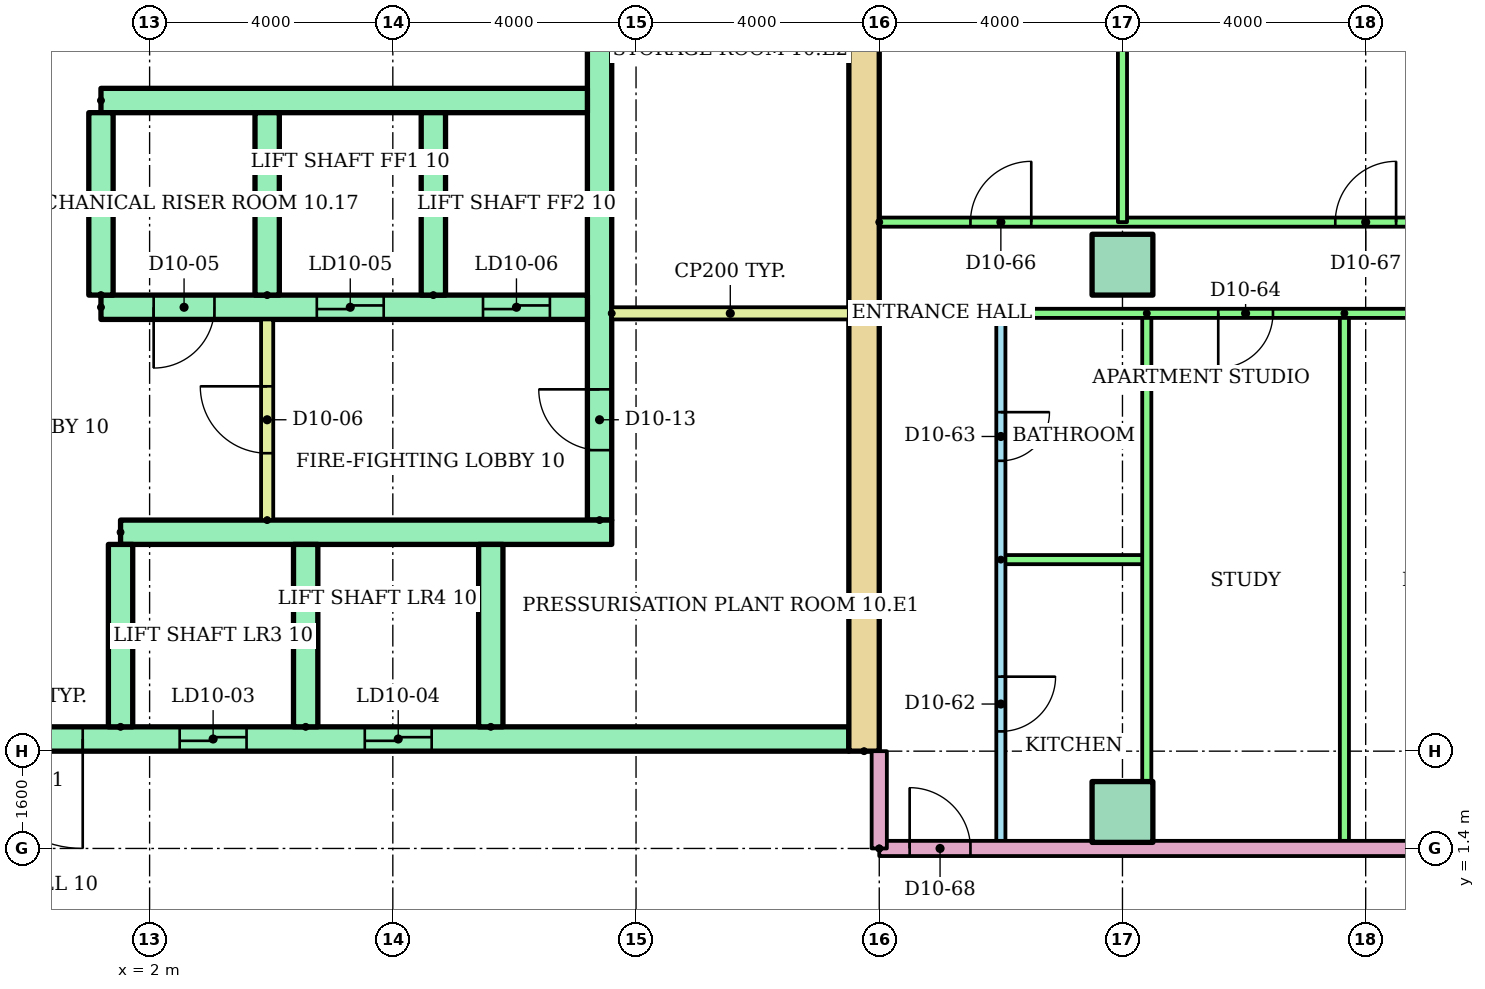
"""IFC4 building model, lengths in metres.
Left out: names, types, materials, properties, quantities, classifications, styles, units other than length and angle.
Written with IfcOpenShell. Run it as: python <this file> out.ifc"""

import sys

from ifc_helpers import new_model, si_unit, direction, frame, frame_2d, origin, origin_2d, place, context, subcontext, project, spatial, rectangle, extrude, element, fill, save


model = new_model("IFC4")
c1 = context("Model", 3, precision=1e-05, world=origin(), true_north=direction((0.0, 1.0)))
c2 = subcontext(c1, "Body", "Model", "MODEL_VIEW")
j1 = project(units=[si_unit("LENGTHUNIT", "METRE"), si_unit("PLANEANGLEUNIT", "RADIAN")], contexts=[c1])
p1 = place(None, origin())
s1 = spatial("IfcSite", under=j1, at=p1, CompositionType="ELEMENT")
p2 = place(p1, origin())
s2 = spatial("IfcBuilding", under=s1, at=p2, CompositionType="ELEMENT")
p3 = place(p2, frame((0.0, 0.0, 41.6)))
s3 = spatial("IfcBuildingStorey", under=s2, at=p3, CompositionType="ELEMENT", Elevation=41.6)
for number, where in (
    (1, (18.0, 2.0, 0.0)),
    (2, (18.0, 11.0, 0.0)),
):
    element("IfcColumn", number, at=place(p3, frame(where)), inside=s3, PredefinedType="COLUMN", context=c2, shape_type="SweptSolid", body=[
        extrude(rectangle(XDim=1.0, YDim=1.0, at=origin_2d()), origin(), (0.0, 0.0, 1.0), 3.2),
    ])
p4 = place(p3, frame((13.75, 3.0, 0.0), z_axis=(0.0, 0.0, 1.0), x_axis=(0.0, 1.0, 0.0)))
e3 = element("IfcWall", 3, at=p4, inside=s3, PredefinedType="SHEAR", context=c2, shape_type="SweptSolid", body=[
    extrude(rectangle(XDim=17.0, YDim=0.5, at=frame_2d((8.5, 0.0))), origin(), (0.0, 0.0, 1.0), 2.92),
])
p5 = place(p3, frame((9.4, 6.8, 0.0), z_axis=(0.0, 0.0, 1.0), x_axis=(0.0, 1.0, 0.0)))
e4 = element("IfcWall", 4, at=p5, inside=s3, PredefinedType="SHEAR", context=c2, shape_type="SweptSolid", body=[
    extrude(rectangle(XDim=12.7, YDim=0.4, at=frame_2d((6.35, 0.0))), origin(), (0.0, 0.0, 1.0), 2.92),
])
p6 = place(p5, frame((1.15, 0.0, 0.0)))
e5 = element("IfcOpeningElement", 5, at=p6, cuts=e4, PredefinedType="OPENING", context=c2, shape_type="SweptSolid", body=[
    extrude(rectangle(XDim=1.0, YDim=2.1, at=frame_2d((0.5, 1.05))), frame((0.0, 0.21, 0.0), z_axis=(0.0, -1.0, 0.0), x_axis=(1.0, 0.0, 0.0)), (0.0, 0.0, 1.0), 0.42),
])
p7 = place(p5, frame((7.925, 0.0, 0.0)))
e6 = element("IfcOpeningElement", 6, at=p7, cuts=e4, PredefinedType="OPENING", context=c2, shape_type="SweptSolid", body=[
    extrude(rectangle(XDim=1.0, YDim=2.1, at=frame_2d((0.5, 1.05))), frame((0.0, 0.21, 0.0), z_axis=(0.0, -1.0, 0.0), x_axis=(1.0, 0.0, 0.0)), (0.0, 0.0, 1.0), 0.42),
])
p8 = place(p3, frame((-13.5, 3.2, 0.0)))
e7 = element("IfcWall", 7, at=p8, inside=s3, PredefinedType="SHEAR", context=c2, shape_type="SweptSolid", body=[
    extrude(rectangle(XDim=27.0, YDim=0.4, at=frame_2d((13.5, 0.0))), origin(), (0.0, 0.0, 1.0), 2.92),
])
p9 = place(p8, frame((6.861, 0.0, 0.0)))
e8 = element("IfcOpeningElement", 8, at=p9, cuts=e7, PredefinedType="OPENING", context=c2, shape_type="SweptSolid", body=[
    extrude(rectangle(XDim=1.1, YDim=2.1, at=frame_2d((0.55, 1.05))), frame((0.0, 0.21, 0.0), z_axis=(0.0, -1.0, 0.0), x_axis=(1.0, 0.0, 0.0)), (0.0, 0.0, 1.0), 0.42),
])
p10 = place(p8, frame((9.906, 0.0, 0.0)))
e9 = element("IfcOpeningElement", 9, at=p10, cuts=e7, PredefinedType="OPENING", context=c2, shape_type="SweptSolid", body=[
    extrude(rectangle(XDim=1.1, YDim=2.1, at=frame_2d((0.55, 1.05))), frame((0.0, 0.21, 0.0), z_axis=(0.0, -1.0, 0.0), x_axis=(1.0, 0.0, 0.0)), (0.0, 0.0, 1.0), 0.42),
])
p11 = place(p8, frame((15.994, 0.0, 0.0)))
e10 = element("IfcOpeningElement", 10, at=p11, cuts=e7, PredefinedType="OPENING", context=c2, shape_type="SweptSolid", body=[
    extrude(rectangle(XDim=1.1, YDim=2.1, at=frame_2d((0.55, 1.05))), frame((0.0, 0.21, 0.0), z_axis=(0.0, -1.0, 0.0), x_axis=(1.0, 0.0, 0.0)), (0.0, 0.0, 1.0), 0.42),
])
p12 = place(p8, frame((19.039, 0.0, 0.0)))
e11 = element("IfcOpeningElement", 11, at=p12, cuts=e7, PredefinedType="OPENING", context=c2, shape_type="SweptSolid", body=[
    extrude(rectangle(XDim=1.1, YDim=2.1, at=frame_2d((0.55, 1.05))), frame((0.0, 0.21, 0.0), z_axis=(0.0, -1.0, 0.0), x_axis=(1.0, 0.0, 0.0)), (0.0, 0.0, 1.0), 0.42),
])
p13 = place(p8, frame((12.6, 0.0, 0.0)))
e12 = element("IfcOpeningElement", 12, at=p13, cuts=e7, PredefinedType="OPENING", context=c2, shape_type="SweptSolid", body=[
    extrude(rectangle(XDim=1.8, YDim=2.1, at=frame_2d((0.9, 1.05))), frame((0.0, 0.21, 0.0), z_axis=(0.0, -1.0, 0.0), x_axis=(1.0, 0.0, 0.0)), (0.0, 0.0, 1.0), 0.42),
])
p14 = place(p3, frame((1.522, 6.6, 0.0)))
e13 = element("IfcWall", 13, at=p14, inside=s3, PredefinedType="SHEAR", context=c2, shape_type="SweptSolid", body=[
    extrude(rectangle(XDim=8.078, YDim=0.4, at=frame_2d((4.039, 0.0))), origin(), (0.0, 0.0, 1.0), 2.92),
])
for number, where, z_axis, x_axis in (
    (14, (1.522, 3.4, 0.0), (0.0, 0.0, 1.0), (0.0, 1.0, 0.0)),
    (15, (4.567, 3.4, 0.0), (0.0, 0.0, 1.0), (0.0, 1.0, 0.0)),
    (16, (7.611, 3.4, 0.0), (0.0, 0.0, 1.0), (0.0, 1.0, 0.0)),
):
    element("IfcWall", number, at=place(p3, frame(where, z_axis=z_axis, x_axis=x_axis)), inside=s3, PredefinedType="SHEAR", context=c2, shape_type="SweptSolid", body=[
        extrude(rectangle(XDim=3.0, YDim=0.4, at=frame_2d((1.5, 0.0))), origin(), (0.0, 0.0, 1.0), 2.92),
    ])
p15 = place(p3, frame((1.2, 10.3, 0.0)))
e17 = element("IfcWall", 17, at=p15, inside=s3, PredefinedType="SHEAR", context=c2, shape_type="SweptSolid", body=[
    extrude(rectangle(XDim=8.0, YDim=0.4, at=frame_2d((4.0, 0.0))), origin(), (0.0, 0.0, 1.0), 2.92),
])
p16 = place(p15, frame((3.55, 0.0, 0.0)))
e18 = element("IfcOpeningElement", 18, at=p16, cuts=e17, PredefinedType="OPENING", context=c2, shape_type="SweptSolid", body=[
    extrude(rectangle(XDim=1.1, YDim=2.1, at=frame_2d((0.55, 1.05))), frame((0.0, 0.21, 0.0), z_axis=(0.0, -1.0, 0.0), x_axis=(1.0, 0.0, 0.0)), (0.0, 0.0, 1.0), 0.42),
])
p17 = place(p15, frame((6.283, 0.0, 0.0)))
e19 = element("IfcOpeningElement", 19, at=p17, cuts=e17, PredefinedType="OPENING", context=c2, shape_type="SweptSolid", body=[
    extrude(rectangle(XDim=1.1, YDim=2.1, at=frame_2d((0.55, 1.05))), frame((0.0, 0.21, 0.0), z_axis=(0.0, -1.0, 0.0), x_axis=(1.0, 0.0, 0.0)), (0.0, 0.0, 1.0), 0.42),
])
p18 = place(p15, frame((0.867, 0.0, 0.0)))
e20 = element("IfcOpeningElement", 20, at=p18, cuts=e17, PredefinedType="OPENING", context=c2, shape_type="SweptSolid", body=[
    extrude(rectangle(XDim=1.0, YDim=2.1, at=frame_2d((0.5, 1.05))), frame((0.0, 0.21, 0.0), z_axis=(0.0, -1.0, 0.0), x_axis=(1.0, 0.0, 0.0)), (0.0, 0.0, 1.0), 0.42),
])
p19 = place(p3, frame((1.2, 13.7, 0.0)))
e21 = element("IfcWall", 21, at=p19, inside=s3, PredefinedType="SHEAR", context=c2, shape_type="SweptSolid", body=[
    extrude(rectangle(XDim=8.0, YDim=0.4, at=frame_2d((4.0, 0.0))), origin(), (0.0, 0.0, 1.0), 2.92),
])
for number, where, z_axis, x_axis in (
    (22, (1.2, 10.5, 0.0), (0.0, 0.0, 1.0), (0.0, 1.0, 0.0)),
    (23, (3.933, 10.5, 0.0), (0.0, 0.0, 1.0), (0.0, 1.0, 0.0)),
    (24, (6.667, 10.5, 0.0), (0.0, 0.0, 1.0), (0.0, 1.0, 0.0)),
):
    element("IfcWall", number, at=place(p3, frame(where, z_axis=z_axis, x_axis=x_axis)), inside=s3, PredefinedType="SHEAR", context=c2, shape_type="SweptSolid", body=[
        extrude(rectangle(XDim=3.0, YDim=0.4, at=frame_2d((1.5, 0.0))), origin(), (0.0, 0.0, 1.0), 2.92),
    ])
p20 = place(p3, frame((3.933, 6.8, 0.0), z_axis=(0.0, 0.0, 1.0), x_axis=(0.0, 1.0, 0.0)))
e25 = element("IfcWall", 25, at=p20, inside=s3, PredefinedType="PARTITIONING", context=c2, shape_type="SweptSolid", body=[
    extrude(rectangle(XDim=3.3, YDim=0.2, at=frame_2d((1.65, 0.0))), origin(), (0.0, 0.0, 1.0), 2.92),
])
p21 = place(p20, frame((1.1, 0.0, 0.0)))
e26 = element("IfcOpeningElement", 26, at=p21, cuts=e25, PredefinedType="OPENING", context=c2, shape_type="SweptSolid", body=[
    extrude(rectangle(XDim=1.1, YDim=2.1, at=frame_2d((0.55, 1.05))), frame((0.0, 0.11, 0.0), z_axis=(0.0, -1.0, 0.0), x_axis=(1.0, 0.0, 0.0)), (0.0, 0.0, 1.0), 0.22),
])
p22 = place(p3, frame((9.6, 10.2, 0.0)))
e27 = element("IfcWall", 27, at=p22, inside=s3, PredefinedType="PARTITIONING", context=c2, shape_type="SweptSolid", body=[
    extrude(rectangle(XDim=3.9, YDim=0.2, at=frame_2d((1.95, 0.0))), origin(), (0.0, 0.0, 1.0), 2.92),
])
p23 = place(p3, frame((16.0, 10.2, 0.0), z_axis=(0.0, 0.0, 1.0), x_axis=(0.0, -1.0, 0.0)))
e28 = element("IfcWall", 28, at=p23, inside=s3, PredefinedType="PARTITIONING", context=c2, shape_type="SweptSolid", body=[
    extrude(rectangle(XDim=8.8, YDim=0.15, at=frame_2d((4.4, 0.0))), origin(), (0.0, 0.0, 1.0), 2.4),
])
p24 = place(p23, frame((5.975, 0.0, 0.0)))
e29 = element("IfcOpeningElement", 29, at=p24, cuts=e28, PredefinedType="OPENING", context=c2, shape_type="SweptSolid", body=[
    extrude(rectangle(XDim=0.9, YDim=2.1, at=frame_2d((0.45, 1.05))), frame((0.0, 0.085, 0.0), z_axis=(0.0, -1.0, 0.0), x_axis=(1.0, 0.0, 0.0)), (0.0, 0.0, 1.0), 0.17),
])
p25 = place(p23, frame((1.625, 0.0, 0.0)))
e30 = element("IfcOpeningElement", 30, at=p25, cuts=e28, PredefinedType="OPENING", context=c2, shape_type="SweptSolid", body=[
    extrude(rectangle(XDim=0.8, YDim=2.1, at=frame_2d((0.4, 1.05))), frame((0.0, 0.085, 0.0), z_axis=(0.0, -1.0, 0.0), x_axis=(1.0, 0.0, 0.0)), (0.0, 0.0, 1.0), 0.17),
])
p26 = place(p3, frame((16.0, 6.15, 0.0)))
e31 = element("IfcWall", 31, at=p26, inside=s3, PredefinedType="PARTITIONING", context=c2, shape_type="SweptSolid", body=[
    extrude(rectangle(XDim=2.4, YDim=0.15, at=frame_2d((1.2, 0.0))), origin(), (0.0, 0.0, 1.0), 2.4),
])
for number, where, z_axis, x_axis in (
    (32, (18.4, 10.2, 0.0), (0.0, 0.0, 1.0), (0.0, -1.0, 0.0)),
    (33, (21.65, 10.2, 0.0), (0.0, 0.0, 1.0), (0.0, -1.0, 0.0)),
):
    element("IfcWall", number, at=place(p3, frame(where, z_axis=z_axis, x_axis=x_axis)), inside=s3, PredefinedType="PARTITIONING", context=c2, shape_type="SweptSolid", body=[
        extrude(rectangle(XDim=8.8, YDim=0.15, at=frame_2d((4.4, 0.0))), origin(), (0.0, 0.0, 1.0), 2.4),
    ])
p27 = place(p3, frame((26.0, 10.2, 0.0), z_axis=(0.0, 0.0, 1.0), x_axis=(-1.0, 0.0, 0.0)))
e34 = element("IfcWall", 34, at=p27, inside=s3, PredefinedType="PARTITIONING", context=c2, shape_type="SweptSolid", body=[
    extrude(rectangle(XDim=10.0, YDim=0.15, at=frame_2d((5.0, 0.0))), origin(), (0.0, 0.0, 1.0), 2.4),
])
p28 = place(p27, frame((5.525, 0.0, 0.0)))
e35 = element("IfcOpeningElement", 35, at=p28, cuts=e34, PredefinedType="OPENING", context=c2, shape_type="SweptSolid", body=[
    extrude(rectangle(XDim=0.9, YDim=2.1, at=frame_2d((0.45, 1.05))), frame((0.0, 0.085, 0.0), z_axis=(0.0, -1.0, 0.0), x_axis=(1.0, 0.0, 0.0)), (0.0, 0.0, 1.0), 0.17),
])
p29 = place(p27, frame((1.725, 0.0, 0.0)))
e36 = element("IfcOpeningElement", 36, at=p29, cuts=e34, PredefinedType="OPENING", context=c2, shape_type="SweptSolid", body=[
    extrude(rectangle(XDim=0.9, YDim=2.1, at=frame_2d((0.45, 1.05))), frame((0.0, 0.085, 0.0), z_axis=(0.0, -1.0, 0.0), x_axis=(1.0, 0.0, 0.0)), (0.0, 0.0, 1.0), 0.17),
])
p30 = place(p3, frame((14.0, 11.7, 0.0)))
e37 = element("IfcWall", 37, at=p30, inside=s3, PredefinedType="PARTITIONING", context=c2, shape_type="SweptSolid", body=[
    extrude(rectangle(XDim=12.0, YDim=0.15, at=frame_2d((6.0, 0.0))), origin(), (0.0, 0.0, 1.0), 2.4),
])
p31 = place(p30, frame((1.5, 0.0, 0.0)))
e38 = element("IfcOpeningElement", 38, at=p31, cuts=e37, PredefinedType="OPENING", context=c2, shape_type="SweptSolid", body=[
    extrude(rectangle(XDim=1.0, YDim=2.1, at=frame_2d((0.5, 1.05))), frame((0.0, 0.085, 0.0), z_axis=(0.0, -1.0, 0.0), x_axis=(1.0, 0.0, 0.0)), (0.0, 0.0, 1.0), 0.17),
])
p32 = place(p30, frame((7.5, 0.0, 0.0)))
e39 = element("IfcOpeningElement", 39, at=p32, cuts=e37, PredefinedType="OPENING", context=c2, shape_type="SweptSolid", body=[
    extrude(rectangle(XDim=1.0, YDim=2.1, at=frame_2d((0.5, 1.05))), frame((0.0, 0.085, 0.0), z_axis=(0.0, -1.0, 0.0), x_axis=(1.0, 0.0, 0.0)), (0.0, 0.0, 1.0), 0.17),
])
p33 = place(p3, frame((18.0, 18.521, 0.0), z_axis=(0.0, 0.0, 1.0), x_axis=(0.0, -1.0, 0.0)))
e40 = element("IfcWall", 40, at=p33, inside=s3, PredefinedType="PARTITIONING", context=c2, shape_type="SweptSolid", body=[
    extrude(rectangle(XDim=6.821, YDim=0.15, at=frame_2d((3.411, 0.0))), origin(), (0.0, 0.0, 1.0), 2.4),
])
p34 = place(p3, frame((14.0, 1.4, 0.0)))
e41 = element("IfcWall", 41, at=p34, inside=s3, PredefinedType="PARTITIONING", context=c2, shape_type="SweptSolid", body=[
    extrude(rectangle(XDim=15.0, YDim=0.25, at=frame_2d((7.5, 0.0))), origin(), (0.0, 0.0, 1.0), 2.4),
])
p35 = place(p34, frame((0.5, 0.0, 0.0)))
e42 = element("IfcOpeningElement", 42, at=p35, cuts=e41, PredefinedType="OPENING", context=c2, shape_type="SweptSolid", body=[
    extrude(rectangle(XDim=1.0, YDim=2.1, at=frame_2d((0.5, 1.05))), frame((0.0, 0.135, 0.0), z_axis=(0.0, -1.0, 0.0), x_axis=(1.0, 0.0, 0.0)), (0.0, 0.0, 1.0), 0.27),
])
p36 = place(p34, frame((12.76, 0.0, 0.0)))
e43 = element("IfcOpeningElement", 43, at=p36, cuts=e41, PredefinedType="OPENING", context=c2, shape_type="SweptSolid", body=[
    extrude(rectangle(XDim=1.0, YDim=2.1, at=frame_2d((0.5, 1.05))), frame((0.0, 0.135, 0.0), z_axis=(0.0, -1.0, 0.0), x_axis=(1.0, 0.0, 0.0)), (0.0, 0.0, 1.0), 0.27),
])
p37 = place(p3, frame((14.0, 1.4, 0.0), z_axis=(0.0, 0.0, 1.0), x_axis=(0.0, 1.0, 0.0)))
e44 = element("IfcWall", 44, at=p37, inside=s3, PredefinedType="PARTITIONING", context=c2, shape_type="SweptSolid", body=[
    extrude(rectangle(XDim=1.6, YDim=0.25, at=frame_2d((0.8, 0.0))), origin(), (0.0, 0.0, 1.0), 2.4),
])
p38 = place(p11, origin())
e45 = element("IfcDoor", 45, at=p38, inside=s3, OperationType="SLIDING_TO_LEFT", PredefinedType="DOOR", context=c2, shape_type="SweptSolid", body=[
    extrude(rectangle(XDim=1.1, YDim=2.1, at=frame_2d((0.55, 1.05))), frame((0.0, 0.025, 0.0), z_axis=(0.0, -1.0, 0.0), x_axis=(1.0, 0.0, 0.0)), (0.0, 0.0, 1.0), 0.05),
])
fill(e10, e45)
p39 = place(p12, origin())
e46 = element("IfcDoor", 46, at=p39, inside=s3, OperationType="SLIDING_TO_LEFT", PredefinedType="DOOR", context=c2, shape_type="SweptSolid", body=[
    extrude(rectangle(XDim=1.1, YDim=2.1, at=frame_2d((0.55, 1.05))), frame((0.0, 0.025, 0.0), z_axis=(0.0, -1.0, 0.0), x_axis=(1.0, 0.0, 0.0)), (0.0, 0.0, 1.0), 0.05),
])
fill(e11, e46)
p40 = place(p13, frame((1.8, 0.0, 0.0), z_axis=(0.0, 0.0, 1.0), x_axis=(-1.0, 0.0, 0.0)))
e47 = element("IfcDoor", 47, at=p40, inside=s3, OperationType="DOUBLE_DOOR_SINGLE_SWING", PredefinedType="DOOR", context=c2, shape_type="SweptSolid", body=[
    extrude(rectangle(XDim=1.8, YDim=2.1, at=frame_2d((0.9, 1.05))), frame((0.0, 0.025, 0.0), z_axis=(0.0, -1.0, 0.0), x_axis=(1.0, 0.0, 0.0)), (0.0, 0.0, 1.0), 0.05),
])
fill(e12, e47)
p41 = place(p16, origin())
e48 = element("IfcDoor", 48, at=p41, inside=s3, OperationType="SLIDING_TO_LEFT", PredefinedType="DOOR", context=c2, shape_type="SweptSolid", body=[
    extrude(rectangle(XDim=1.1, YDim=2.1, at=frame_2d((0.55, 1.05))), frame((0.0, 0.025, 0.0), z_axis=(0.0, -1.0, 0.0), x_axis=(1.0, 0.0, 0.0)), (0.0, 0.0, 1.0), 0.05),
])
fill(e18, e48)
p42 = place(p17, origin())
e49 = element("IfcDoor", 49, at=p42, inside=s3, OperationType="SLIDING_TO_LEFT", PredefinedType="DOOR", context=c2, shape_type="SweptSolid", body=[
    extrude(rectangle(XDim=1.1, YDim=2.1, at=frame_2d((0.55, 1.05))), frame((0.0, 0.025, 0.0), z_axis=(0.0, -1.0, 0.0), x_axis=(1.0, 0.0, 0.0)), (0.0, 0.0, 1.0), 0.05),
])
fill(e19, e49)
p43 = place(p18, frame((1.0, 0.0, 0.0), z_axis=(0.0, 0.0, 1.0), x_axis=(-1.0, 0.0, 0.0)))
e50 = element("IfcDoor", 50, at=p43, inside=s3, OperationType="SINGLE_SWING_LEFT", PredefinedType="DOOR", context=c2, shape_type="SweptSolid", body=[
    extrude(rectangle(XDim=1.0, YDim=2.1, at=frame_2d((0.5, 1.05))), frame((0.0, 0.025, 0.0), z_axis=(0.0, -1.0, 0.0), x_axis=(1.0, 0.0, 0.0)), (0.0, 0.0, 1.0), 0.05),
])
fill(e20, e50)
p44 = place(p21, origin())
e51 = element("IfcDoor", 51, at=p44, inside=s3, OperationType="SINGLE_SWING_RIGHT", PredefinedType="DOOR", context=c2, shape_type="SweptSolid", body=[
    extrude(rectangle(XDim=1.1, YDim=2.1, at=frame_2d((0.55, 1.05))), frame((0.0, 0.025, 0.0), z_axis=(0.0, -1.0, 0.0), x_axis=(1.0, 0.0, 0.0)), (0.0, 0.0, 1.0), 0.05),
])
fill(e26, e51)
p45 = place(p6, origin())
e52 = element("IfcDoor", 52, at=p45, inside=s3, OperationType="SINGLE_SWING_RIGHT", PredefinedType="DOOR", context=c2, shape_type="SweptSolid", body=[
    extrude(rectangle(XDim=1.0, YDim=2.1, at=frame_2d((0.5, 1.05))), frame((0.0, 0.025, 0.0), z_axis=(0.0, -1.0, 0.0), x_axis=(1.0, 0.0, 0.0)), (0.0, 0.0, 1.0), 0.05),
])
fill(e5, e52)
p46 = place(p24, origin())
e53 = element("IfcDoor", 53, at=p46, inside=s3, OperationType="SINGLE_SWING_LEFT", PredefinedType="DOOR", context=c2, shape_type="SweptSolid", body=[
    extrude(rectangle(XDim=0.9, YDim=2.1, at=frame_2d((0.45, 1.05))), frame((0.0, 0.025, 0.0), z_axis=(0.0, -1.0, 0.0), x_axis=(1.0, 0.0, 0.0)), (0.0, 0.0, 1.0), 0.05),
])
fill(e29, e53)
p47 = place(p25, origin())
e54 = element("IfcDoor", 54, at=p47, inside=s3, OperationType="SINGLE_SWING_LEFT", PredefinedType="DOOR", context=c2, shape_type="SweptSolid", body=[
    extrude(rectangle(XDim=0.8, YDim=2.1, at=frame_2d((0.4, 1.05))), frame((0.0, 0.025, 0.0), z_axis=(0.0, -1.0, 0.0), x_axis=(1.0, 0.0, 0.0)), (0.0, 0.0, 1.0), 0.05),
])
fill(e30, e54)
p48 = place(p28, origin())
e55 = element("IfcDoor", 55, at=p48, inside=s3, OperationType="SINGLE_SWING_RIGHT", PredefinedType="DOOR", context=c2, shape_type="SweptSolid", body=[
    extrude(rectangle(XDim=0.9, YDim=2.1, at=frame_2d((0.45, 1.05))), frame((0.0, 0.025, 0.0), z_axis=(0.0, -1.0, 0.0), x_axis=(1.0, 0.0, 0.0)), (0.0, 0.0, 1.0), 0.05),
])
fill(e35, e55)
p49 = place(p31, origin())
e56 = element("IfcDoor", 56, at=p49, inside=s3, OperationType="SINGLE_SWING_RIGHT", PredefinedType="DOOR", context=c2, shape_type="SweptSolid", body=[
    extrude(rectangle(XDim=1.0, YDim=2.1, at=frame_2d((0.5, 1.05))), frame((0.0, 0.025, 0.0), z_axis=(0.0, -1.0, 0.0), x_axis=(1.0, 0.0, 0.0)), (0.0, 0.0, 1.0), 0.05),
])
fill(e38, e56)
p50 = place(p32, origin())
e57 = element("IfcDoor", 57, at=p50, inside=s3, OperationType="SINGLE_SWING_RIGHT", PredefinedType="DOOR", context=c2, shape_type="SweptSolid", body=[
    extrude(rectangle(XDim=1.0, YDim=2.1, at=frame_2d((0.5, 1.05))), frame((0.0, 0.025, 0.0), z_axis=(0.0, -1.0, 0.0), x_axis=(1.0, 0.0, 0.0)), (0.0, 0.0, 1.0), 0.05),
])
fill(e39, e57)
p51 = place(p35, origin())
e58 = element("IfcDoor", 58, at=p51, inside=s3, OperationType="SINGLE_SWING_LEFT", PredefinedType="DOOR", context=c2, shape_type="SweptSolid", body=[
    extrude(rectangle(XDim=1.0, YDim=2.1, at=frame_2d((0.5, 1.05))), frame((0.0, 0.025, 0.0), z_axis=(0.0, -1.0, 0.0), x_axis=(1.0, 0.0, 0.0)), (0.0, 0.0, 1.0), 0.05),
])
fill(e42, e58)
save(model, sys.argv[1])
